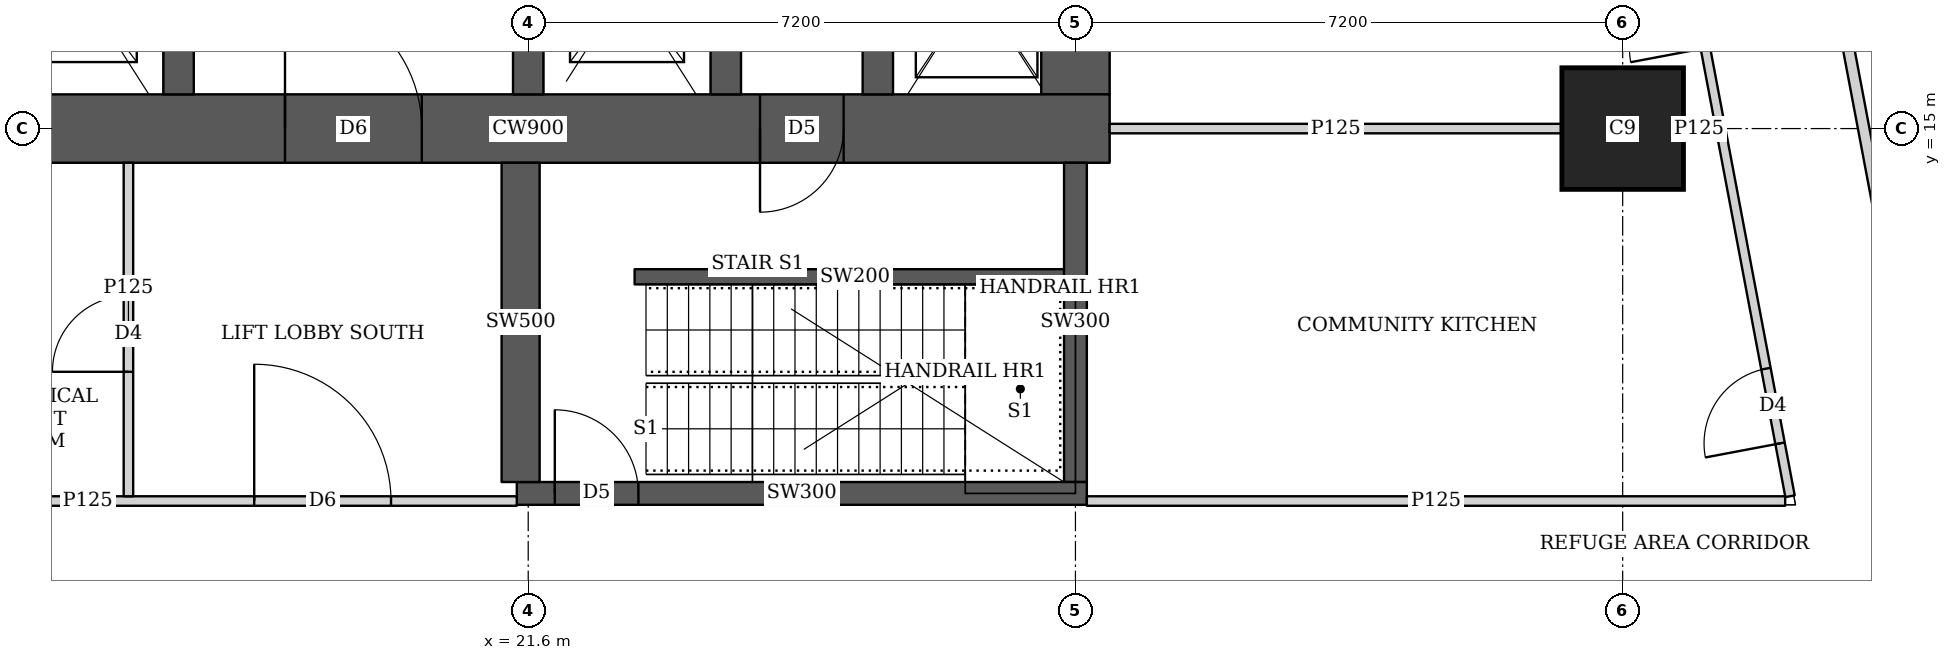
"""IFC4 building model, lengths in metres.
Left out: names, types, materials, properties, quantities, classifications, styles, units other than length and angle.
Written with IfcOpenShell. Run it as: python <this file> out.ifc"""

import sys

from ifc_helpers import new_model, si_unit, direction, frame, frame_2d, origin, origin_2d, place, context, subcontext, project, spatial, rectangle, extrude, element, fill, save


model = new_model("IFC4")
c1 = context("Model", 3, precision=1e-05, world=origin(), true_north=direction((0.0, 1.0)))
c2 = subcontext(c1, "Body", "Model", "MODEL_VIEW")
j1 = project(units=[si_unit("LENGTHUNIT", "METRE"), si_unit("PLANEANGLEUNIT", "RADIAN")], contexts=[c1])
p1 = place(None, origin())
s1 = spatial("IfcSite", under=j1, at=p1, CompositionType="ELEMENT")
p2 = place(p1, origin())
s2 = spatial("IfcBuilding", under=s1, at=p2, CompositionType="ELEMENT")
p3 = place(p2, frame((0.0, 0.0, 130.4)))
s3 = spatial("IfcBuildingStorey", under=s2, at=p3, CompositionType="ELEMENT", Elevation=130.4)
p4 = place(p3, frame((36.0, 15.0, 0.0), z_axis=(0.0, 0.0, 1.0), x_axis=(1.0, 0.0, 0.0)))
e1 = element("IfcColumn", 1, at=p4, inside=s3, PredefinedType="COLUMN", context=c2, shape_type="SweptSolid", body=[
    extrude(rectangle(XDim=1.6, YDim=1.6, at=origin_2d()), origin(), (0.0, 0.0, 1.0), 5.4),
])
p5 = place(p3, frame((13.95, 15.0, 0.0), z_axis=(0.0, 0.0, 1.0), x_axis=(1.0, 0.0, 0.0)))
e2 = element("IfcWall", 2, at=p5, inside=s3, PredefinedType="SHEAR", context=c2, shape_type="SweptSolid", body=[
    extrude(rectangle(XDim=15.3, YDim=0.9, at=frame_2d((7.65, 0.0))), origin(), (0.0, 0.0, 1.0), 5.4),
])
p6 = place(p5, frame((4.45, 0.0, 0.0)))
e3 = element("IfcOpeningElement", 3, at=p6, cuts=e2, PredefinedType="OPENING", context=c2, shape_type="SweptSolid", body=[
    extrude(rectangle(XDim=1.8, YDim=2.1, at=frame_2d((0.9, 1.05))), frame((0.0, 0.46, 0.0), z_axis=(0.0, -1.0, 0.0), x_axis=(1.0, 0.0, 0.0)), (0.0, 0.0, 1.0), 0.92),
])
p7 = place(p5, frame((10.7, 0.0, 0.0)))
e4 = element("IfcOpeningElement", 4, at=p7, cuts=e2, PredefinedType="OPENING", context=c2, shape_type="SweptSolid", body=[
    extrude(rectangle(XDim=1.1, YDim=2.1, at=frame_2d((0.55, 1.05))), frame((0.0, 0.46, 0.0), z_axis=(0.0, -1.0, 0.0), x_axis=(1.0, 0.0, 0.0)), (0.0, 0.0, 1.0), 0.92),
])
p8 = place(p3, frame((28.8, 15.45, 0.0), z_axis=(0.0, 0.0, 1.0), x_axis=(0.0, 1.0, 0.0)))
e5 = element("IfcWall", 5, at=p8, inside=s3, PredefinedType="SHEAR", context=c2, shape_type="SweptSolid", body=[
    extrude(rectangle(XDim=14.1, YDim=0.9, at=frame_2d((7.05, 0.0))), origin(), (0.0, 0.0, 1.0), 5.4),
])
p9 = place(p3, frame((17.0, 15.45, 0.0), z_axis=(0.0, 0.0, 1.0), x_axis=(0.0, 1.0, 0.0)))
e6 = element("IfcWall", 6, at=p9, inside=s3, PredefinedType="SHEAR", context=c2, shape_type="SweptSolid", body=[
    extrude(rectangle(XDim=14.1, YDim=0.4, at=frame_2d((7.05, 0.0))), origin(), (0.0, 0.0, 1.0), 5.4),
])
p10 = place(p9, frame((0.875, 0.0, 0.0)))
e7 = element("IfcOpeningElement", 7, at=p10, cuts=e6, PredefinedType="OPENING", context=c2, shape_type="SweptSolid", body=[
    extrude(rectangle(XDim=1.1, YDim=2.1, at=frame_2d((0.55, 1.05))), frame((0.0, 0.21, 0.0), z_axis=(0.0, -1.0, 0.0), x_axis=(1.0, 0.0, 0.0)), (0.0, 0.0, 1.0), 0.42),
])
p11 = place(p9, frame((4.625, 0.0, 0.0)))
e8 = element("IfcOpeningElement", 8, at=p11, cuts=e6, PredefinedType="OPENING", context=c2, shape_type="SweptSolid", body=[
    extrude(rectangle(XDim=1.1, YDim=2.1, at=frame_2d((0.55, 1.05))), frame((0.0, 0.21, 0.0), z_axis=(0.0, -1.0, 0.0), x_axis=(1.0, 0.0, 0.0)), (0.0, 0.0, 1.0), 0.42),
])
p12 = place(p9, frame((8.375, 0.0, 0.0)))
e9 = element("IfcOpeningElement", 9, at=p12, cuts=e6, PredefinedType="OPENING", context=c2, shape_type="SweptSolid", body=[
    extrude(rectangle(XDim=1.1, YDim=2.1, at=frame_2d((0.55, 1.05))), frame((0.0, 0.21, 0.0), z_axis=(0.0, -1.0, 0.0), x_axis=(1.0, 0.0, 0.0)), (0.0, 0.0, 1.0), 0.42),
])
p13 = place(p9, frame((12.125, 0.0, 0.0)))
e10 = element("IfcOpeningElement", 10, at=p13, cuts=e6, PredefinedType="OPENING", context=c2, shape_type="SweptSolid", body=[
    extrude(rectangle(XDim=1.1, YDim=2.1, at=frame_2d((0.55, 1.05))), frame((0.0, 0.21, 0.0), z_axis=(0.0, -1.0, 0.0), x_axis=(1.0, 0.0, 0.0)), (0.0, 0.0, 1.0), 0.42),
])
p14 = place(p3, frame((21.6, 15.45, 0.0), z_axis=(0.0, 0.0, 1.0), x_axis=(0.0, 1.0, 0.0)))
e11 = element("IfcWall", 11, at=p14, inside=s3, PredefinedType="SHEAR", context=c2, shape_type="SweptSolid", body=[
    extrude(rectangle(XDim=14.1, YDim=0.4, at=frame_2d((7.05, 0.0))), origin(), (0.0, 0.0, 1.0), 5.4),
])
p15 = place(p14, frame((0.875, 0.0, 0.0)))
e12 = element("IfcOpeningElement", 12, at=p15, cuts=e11, PredefinedType="OPENING", context=c2, shape_type="SweptSolid", body=[
    extrude(rectangle(XDim=1.1, YDim=2.1, at=frame_2d((0.55, 1.05))), frame((0.0, 0.21, 0.0), z_axis=(0.0, -1.0, 0.0), x_axis=(1.0, 0.0, 0.0)), (0.0, 0.0, 1.0), 0.42),
])
p16 = place(p14, frame((4.625, 0.0, 0.0)))
e13 = element("IfcOpeningElement", 13, at=p16, cuts=e11, PredefinedType="OPENING", context=c2, shape_type="SweptSolid", body=[
    extrude(rectangle(XDim=1.1, YDim=2.1, at=frame_2d((0.55, 1.05))), frame((0.0, 0.21, 0.0), z_axis=(0.0, -1.0, 0.0), x_axis=(1.0, 0.0, 0.0)), (0.0, 0.0, 1.0), 0.42),
])
p17 = place(p14, frame((8.375, 0.0, 0.0)))
e14 = element("IfcOpeningElement", 14, at=p17, cuts=e11, PredefinedType="OPENING", context=c2, shape_type="SweptSolid", body=[
    extrude(rectangle(XDim=1.1, YDim=2.1, at=frame_2d((0.55, 1.05))), frame((0.0, 0.21, 0.0), z_axis=(0.0, -1.0, 0.0), x_axis=(1.0, 0.0, 0.0)), (0.0, 0.0, 1.0), 0.42),
])
p18 = place(p14, frame((12.125, 0.0, 0.0)))
e15 = element("IfcOpeningElement", 15, at=p18, cuts=e11, PredefinedType="OPENING", context=c2, shape_type="SweptSolid", body=[
    extrude(rectangle(XDim=1.1, YDim=2.1, at=frame_2d((0.55, 1.05))), frame((0.0, 0.21, 0.0), z_axis=(0.0, -1.0, 0.0), x_axis=(1.0, 0.0, 0.0)), (0.0, 0.0, 1.0), 0.42),
])
p19 = place(p3, frame((24.2, 15.45, 0.0), z_axis=(0.0, 0.0, 1.0), x_axis=(0.0, 1.0, 0.0)))
e16 = element("IfcWall", 16, at=p19, inside=s3, PredefinedType="SHEAR", context=c2, shape_type="SweptSolid", body=[
    extrude(rectangle(XDim=14.1, YDim=0.4, at=frame_2d((7.05, 0.0))), origin(), (0.0, 0.0, 1.0), 5.4),
])
p20 = place(p3, frame((26.2, 15.45, 0.0), z_axis=(0.0, 0.0, 1.0), x_axis=(0.0, 1.0, 0.0)))
e17 = element("IfcWall", 17, at=p20, inside=s3, PredefinedType="SHEAR", context=c2, shape_type="SweptSolid", body=[
    extrude(rectangle(XDim=3.1, YDim=0.4, at=frame_2d((1.55, 0.0))), origin(), (0.0, 0.0, 1.0), 5.4),
])
p21 = place(p20, frame((0.825, 0.0, 0.0)))
e18 = element("IfcOpeningElement", 18, at=p21, cuts=e17, PredefinedType="OPENING", context=c2, shape_type="SweptSolid", body=[
    extrude(rectangle(XDim=1.2, YDim=2.1, at=frame_2d((0.6, 1.05))), frame((0.0, 0.21, 0.0), z_axis=(0.0, -1.0, 0.0), x_axis=(1.0, 0.0, 0.0)), (0.0, 0.0, 1.0), 0.42),
])
p22 = place(p3, frame((21.45, 10.2, 0.0), z_axis=(0.0, 0.0, 1.0), x_axis=(1.0, 0.0, 0.0)))
e19 = element("IfcWall", 19, at=p22, inside=s3, PredefinedType="SHEAR", context=c2, shape_type="SweptSolid", body=[
    extrude(rectangle(XDim=7.5, YDim=0.3, at=frame_2d((3.75, 0.0))), origin(), (0.0, 0.0, 1.0), 5.4),
])
p23 = place(p22, frame((0.5, 0.0, 0.0)))
e20 = element("IfcOpeningElement", 20, at=p23, cuts=e19, PredefinedType="OPENING", context=c2, shape_type="SweptSolid", body=[
    extrude(rectangle(XDim=1.1, YDim=2.1, at=frame_2d((0.55, 1.05))), frame((0.0, 0.16, 0.0), z_axis=(0.0, -1.0, 0.0), x_axis=(1.0, 0.0, 0.0)), (0.0, 0.0, 1.0), 0.32),
])
p24 = place(p3, frame((21.5, 10.35, 0.0), z_axis=(0.0, 0.0, 1.0), x_axis=(0.0, 1.0, 0.0)))
e21 = element("IfcWall", 21, at=p24, inside=s3, PredefinedType="SHEAR", context=c2, shape_type="SweptSolid", body=[
    extrude(rectangle(XDim=4.2, YDim=0.5, at=frame_2d((2.1, 0.0))), origin(), (0.0, 0.0, 1.0), 5.4),
])
p25 = place(p3, frame((28.8, 10.35, 0.0), z_axis=(0.0, 0.0, 1.0), x_axis=(0.0, 1.0, 0.0)))
e22 = element("IfcWall", 22, at=p25, inside=s3, PredefinedType="SHEAR", context=c2, shape_type="SweptSolid", body=[
    extrude(rectangle(XDim=4.2, YDim=0.3, at=frame_2d((2.1, 0.0))), origin(), (0.0, 0.0, 1.0), 5.4),
])
p26 = place(p3, frame((33.382, 45.65, 0.0), z_axis=(0.0, 0.0, 1.0), x_axis=(0.185593544777, -0.982626600565, 0.0)))
e23 = element("IfcWall", 23, at=p26, inside=s3, PredefinedType="SOLIDWALL", context=c2, shape_type="SweptSolid", body=[
    extrude(rectangle(XDim=47.118, YDim=0.15, at=frame_2d((23.559, 0.0))), origin(), (0.0, 0.0, 1.0), 3.35),
])
p27 = place(p26, frame((24.35, 0.0, 0.0)))
e24 = element("IfcOpeningElement", 24, at=p27, cuts=e23, PredefinedType="OPENING", context=c2, shape_type="SweptSolid", body=[
    extrude(rectangle(XDim=1.0, YDim=2.1, at=frame_2d((0.5, 1.05))), frame((0.0, 0.085, 0.0), z_axis=(0.0, -1.0, 0.0), x_axis=(1.0, 0.0, 0.0)), (0.0, 0.0, 1.0), 0.17),
])
p28 = place(p3, frame((10.163, 10.1, 0.0), z_axis=(0.0, 0.0, 1.0), x_axis=(1.0, 0.0, 0.0)))
e25 = element("IfcWall", 25, at=p28, inside=s3, PredefinedType="PARTITIONING", context=c2, shape_type="SweptSolid", body=[
    extrude(rectangle(XDim=11.287, YDim=0.125, at=frame_2d((5.644, 0.0))), origin(), (0.0, 0.0, 1.0), 3.15),
])
p29 = place(p28, frame((7.832, 0.0, 0.0)))
e26 = element("IfcOpeningElement", 26, at=p29, cuts=e25, PredefinedType="OPENING", context=c2, shape_type="SweptSolid", body=[
    extrude(rectangle(XDim=1.8, YDim=2.1, at=frame_2d((0.9, 1.05))), frame((0.0, 0.073, 0.0), z_axis=(0.0, -1.0, 0.0), x_axis=(1.0, 0.0, 0.0)), (0.0, 0.0, 1.0), 0.145),
])
p30 = place(p3, frame((16.34, 10.163, 0.0), z_axis=(0.0, 0.0, 1.0), x_axis=(0.0, 1.0, 0.0)))
e27 = element("IfcWall", 27, at=p30, inside=s3, PredefinedType="PARTITIONING", context=c2, shape_type="SweptSolid", body=[
    extrude(rectangle(XDim=4.387, YDim=0.125, at=frame_2d((2.193, 0.0))), origin(), (0.0, 0.0, 1.0), 5.15),
])
p31 = place(p30, frame((1.637, 0.0, 0.0)))
e28 = element("IfcOpeningElement", 28, at=p31, cuts=e27, PredefinedType="OPENING", context=c2, shape_type="SweptSolid", body=[
    extrude(rectangle(XDim=1.0, YDim=2.1, at=frame_2d((0.5, 1.05))), frame((0.0, 0.073, 0.0), z_axis=(0.0, -1.0, 0.0), x_axis=(1.0, 0.0, 0.0)), (0.0, 0.0, 1.0), 0.145),
])
p32 = place(p3, frame((28.95, 10.1, 0.0), z_axis=(0.0, 0.0, 1.0), x_axis=(1.0, 0.0, 0.0)))
e29 = element("IfcWall", 29, at=p32, inside=s3, PredefinedType="PARTITIONING", context=c2, shape_type="SweptSolid", body=[
    extrude(rectangle(XDim=9.188, YDim=0.125, at=frame_2d((4.594, 0.0))), origin(), (0.0, 0.0, 1.0), 3.15),
])
p33 = place(p3, frame((38.202, 10.163, 0.0), z_axis=(0.0, 0.0, 1.0), x_axis=(-0.185610321132, 0.982623431783, 0.0)))
e30 = element("IfcWall", 30, at=p33, inside=s3, PredefinedType="PARTITIONING", context=c2, shape_type="SweptSolid", body=[
    extrude(rectangle(XDim=25.111, YDim=0.125, at=frame_2d((12.556, 0.0))), origin(), (0.0, 0.0, 1.0), 3.55),
])
p34 = place(p33, frame((0.708, 0.0, 0.0)))
e31 = element("IfcOpeningElement", 31, at=p34, cuts=e30, PredefinedType="OPENING", context=c2, shape_type="SweptSolid", body=[
    extrude(rectangle(XDim=1.0, YDim=2.1, at=frame_2d((0.5, 1.05))), frame((0.0, 0.073, 0.0), z_axis=(0.0, -1.0, 0.0), x_axis=(1.0, 0.0, 0.0)), (0.0, 0.0, 1.0), 0.145),
])
p35 = place(p33, frame((6.0, 0.0, 0.0)))
e32 = element("IfcOpeningElement", 32, at=p35, cuts=e30, PredefinedType="OPENING", context=c2, shape_type="SweptSolid", body=[
    extrude(rectangle(XDim=1.0, YDim=2.1, at=frame_2d((0.5, 1.05))), frame((0.0, 0.073, 0.0), z_axis=(0.0, -1.0, 0.0), x_axis=(1.0, 0.0, 0.0)), (0.0, 0.0, 1.0), 0.145),
])
p36 = place(p33, frame((13.378, 0.0, 0.0)))
e33 = element("IfcOpeningElement", 33, at=p36, cuts=e30, PredefinedType="OPENING", context=c2, shape_type="SweptSolid", body=[
    extrude(rectangle(XDim=1.0, YDim=2.1, at=frame_2d((0.5, 1.05))), frame((0.0, 0.073, 0.0), z_axis=(0.0, -1.0, 0.0), x_axis=(1.0, 0.0, 0.0)), (0.0, 0.0, 1.0), 0.145),
])
p37 = place(p33, frame((21.25, 0.0, 0.0)))
e34 = element("IfcOpeningElement", 34, at=p37, cuts=e30, PredefinedType="OPENING", context=c2, shape_type="SweptSolid", body=[
    extrude(rectangle(XDim=1.0, YDim=2.1, at=frame_2d((0.5, 1.05))), frame((0.0, 0.073, 0.0), z_axis=(0.0, -1.0, 0.0), x_axis=(1.0, 0.0, 0.0)), (0.0, 0.0, 1.0), 0.145),
])
p38 = place(p3, frame((29.25, 15.0, 0.0), z_axis=(0.0, 0.0, 1.0), x_axis=(1.0, 0.0, 0.0)))
e35 = element("IfcWall", 35, at=p38, inside=s3, PredefinedType="PARTITIONING", context=c2, shape_type="SweptSolid", body=[
    extrude(rectangle(XDim=5.949, YDim=0.125, at=frame_2d((2.975, 0.0))), origin(), (0.0, 0.0, 1.0), 3.55),
])
p39 = place(p3, frame((36.801, 15.0, 0.0), z_axis=(0.0, 0.0, 1.0), x_axis=(1.0, 0.0, 0.0)))
e36 = element("IfcWall", 36, at=p39, inside=s3, PredefinedType="PARTITIONING", context=c2, shape_type="SweptSolid", body=[
    extrude(rectangle(XDim=0.412, YDim=0.125, at=frame_2d((0.206, 0.0))), origin(), (0.0, 0.0, 1.0), 3.55),
])
p40 = place(p3, frame((23.0, 13.05, 0.0), z_axis=(0.0, 0.0, 1.0), x_axis=(1.0, 0.0, 0.0)))
e37 = element("IfcWall", 37, at=p40, inside=s3, PredefinedType="SHEAR", context=c2, shape_type="SweptSolid", body=[
    extrude(rectangle(XDim=5.8, YDim=0.2, at=frame_2d((2.9, 0.0))), origin(), (0.0, 0.0, 1.0), 5.4),
])
p41 = place(p31, origin())
e38 = element("IfcDoor", 38, at=p41, inside=s3, OperationType="SINGLE_SWING_LEFT", PredefinedType="DOOR", context=c2, shape_type="SweptSolid", body=[
    extrude(rectangle(XDim=1.0, YDim=2.1, at=frame_2d((0.5, 1.05))), frame((0.0, 0.025, 0.0), z_axis=(0.0, -1.0, 0.0), x_axis=(1.0, 0.0, 0.0)), (0.0, 0.0, 1.0), 0.05),
])
fill(e28, e38)
p42 = place(p29, origin())
e39 = element("IfcDoor", 39, at=p42, inside=s3, OperationType="DOUBLE_DOOR_SINGLE_SWING", PredefinedType="DOOR", context=c2, shape_type="SweptSolid", body=[
    extrude(rectangle(XDim=1.8, YDim=2.1, at=frame_2d((0.9, 1.05))), frame((0.0, 0.025, 0.0), z_axis=(0.0, -1.0, 0.0), x_axis=(1.0, 0.0, 0.0)), (0.0, 0.0, 1.0), 0.05),
])
fill(e26, e39)
p43 = place(p34, origin())
e40 = element("IfcDoor", 40, at=p43, inside=s3, OperationType="SINGLE_SWING_LEFT", PredefinedType="DOOR", context=c2, shape_type="SweptSolid", body=[
    extrude(rectangle(XDim=1.0, YDim=2.1, at=frame_2d((0.5, 1.05))), frame((0.0, 0.025, 0.0), z_axis=(0.0, -1.0, 0.0), x_axis=(1.0, 0.0, 0.0)), (0.0, 0.0, 1.0), 0.05),
])
fill(e31, e40)
p44 = place(p6, origin())
e41 = element("IfcDoor", 41, at=p44, inside=s3, OperationType="DOUBLE_DOOR_SINGLE_SWING", PredefinedType="DOOR", context=c2, shape_type="SweptSolid", body=[
    extrude(rectangle(XDim=1.8, YDim=2.1, at=frame_2d((0.9, 1.05))), frame((0.0, 0.025, 0.0), z_axis=(0.0, -1.0, 0.0), x_axis=(1.0, 0.0, 0.0)), (0.0, 0.0, 1.0), 0.05),
])
fill(e3, e41)
p45 = place(p7, origin())
e42 = element("IfcDoor", 42, at=p45, inside=s3, OperationType="SINGLE_SWING_RIGHT", PredefinedType="DOOR", context=c2, shape_type="SweptSolid", body=[
    extrude(rectangle(XDim=1.1, YDim=2.1, at=frame_2d((0.55, 1.05))), frame((0.0, 0.025, 0.0), z_axis=(0.0, -1.0, 0.0), x_axis=(1.0, 0.0, 0.0)), (0.0, 0.0, 1.0), 0.05),
])
fill(e4, e42)
p46 = place(p23, origin())
e43 = element("IfcDoor", 43, at=p46, inside=s3, OperationType="SINGLE_SWING_LEFT", PredefinedType="DOOR", context=c2, shape_type="SweptSolid", body=[
    extrude(rectangle(XDim=1.1, YDim=2.1, at=frame_2d((0.55, 1.05))), frame((0.0, 0.025, 0.0), z_axis=(0.0, -1.0, 0.0), x_axis=(1.0, 0.0, 0.0)), (0.0, 0.0, 1.0), 0.05),
])
fill(e20, e43)
save(model, sys.argv[1])
